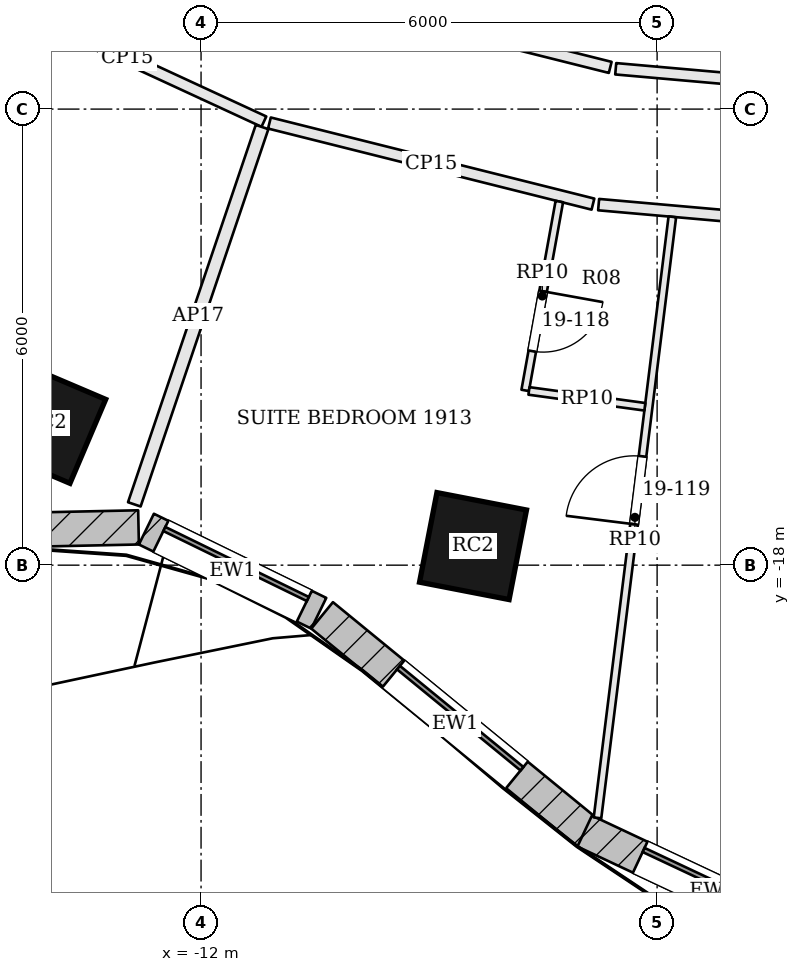
"""IFC4 building model, lengths in metres.
Left out: names, types, materials, properties, quantities, classifications, styles, units other than length and angle.
Written with IfcOpenShell. Run it as: python <this file> out.ifc"""

import sys

from ifc_helpers import new_model, si_unit, direction, frame, frame_2d, origin, origin_2d, place, context, subcontext, project, spatial, rectangle, extrude, element, fill, save


model = new_model("IFC4")
c1 = context("Model", 3, precision=1e-05, world=origin(), true_north=direction((0.0, 1.0)))
c2 = subcontext(c1, "Body", "Model", "MODEL_VIEW")
j1 = project(units=[si_unit("LENGTHUNIT", "METRE"), si_unit("PLANEANGLEUNIT", "RADIAN")], contexts=[c1])
p1 = place(None, origin())
s1 = spatial("IfcSite", under=j1, at=p1, CompositionType="ELEMENT")
p2 = place(p1, origin())
s2 = spatial("IfcBuilding", under=s1, at=p2, CompositionType="ELEMENT")
p3 = place(p2, frame((0.0, 0.0, 85.2)))
s3 = spatial("IfcBuildingStorey", under=s2, at=p3, CompositionType="ELEMENT", Elevation=85.2)
for number, where, z_axis, x_axis in (
    (1, (-14.042, -16.136, 0.0), (0.0, 0.0, 1.0), (0.92, -0.392, 0.0)),
    (2, (-8.422, -17.749, 0.0), (0.0, 0.0, 1.0), (0.982, -0.191, 0.0)),
):
    element("IfcColumn", number, at=place(p3, frame(where, z_axis=z_axis, x_axis=x_axis)), inside=s3, PredefinedType="COLUMN", context=c2, shape_type="SweptSolid", body=[
        extrude(rectangle(XDim=1.2, YDim=1.2, at=origin_2d()), origin(), (0.0, 0.0, 1.0), 3.6),
    ])
p4 = place(p3, frame((-18.434, -17.622, 0.0), z_axis=(0.0, 0.0, 1.0), x_axis=(0.999773749739, 0.021270856405, 0.0)))
e3 = element("IfcWall", 3, at=p4, inside=s3, PredefinedType="SOLIDWALL", context=c2, shape_type="SweptSolid", body=[
    extrude(rectangle(XDim=5.613, YDim=0.45, at=frame_2d((2.806, 0.0))), origin(), (0.0, 0.0, 1.0), 3.4),
])
p5 = place(p4, frame((1.756, 0.0, 0.9)))
e4 = element("IfcOpeningElement", 4, at=p5, cuts=e3, PredefinedType="OPENING", context=c2, shape_type="SweptSolid", body=[
    extrude(rectangle(XDim=2.1, YDim=2.0, at=frame_2d((1.05, 1.0))), frame((0.0, 0.235, 0.0), z_axis=(0.0, -1.0, 0.0), x_axis=(1.0, 0.0, 0.0)), (0.0, 0.0, 1.0), 0.47),
])
p6 = place(p3, frame((-12.719, -17.526, 0.0), z_axis=(0.0, 0.0, 1.0), x_axis=(0.898643806462, -0.438679050226, 0.0)))
e5 = element("IfcWall", 5, at=p6, inside=s3, PredefinedType="SOLIDWALL", context=c2, shape_type="SweptSolid", body=[
    extrude(rectangle(XDim=2.523, YDim=0.45, at=frame_2d((1.262, 0.0))), origin(), (0.0, 0.0, 1.0), 3.4),
])
p7 = place(p6, frame((0.212, 0.0, 0.9)))
e6 = element("IfcOpeningElement", 6, at=p7, cuts=e5, PredefinedType="OPENING", context=c2, shape_type="SweptSolid", body=[
    extrude(rectangle(XDim=2.1, YDim=2.0, at=frame_2d((1.05, 1.0))), frame((0.0, 0.235, 0.0), z_axis=(0.0, -1.0, 0.0), x_axis=(1.0, 0.0, 0.0)), (0.0, 0.0, 1.0), 0.47),
])
p8 = place(p3, frame((-10.407, -18.661, 0.0), z_axis=(0.0, 0.0, 1.0), x_axis=(0.773702458947, -0.633549133864, 0.0)))
e7 = element("IfcWall", 7, at=p8, inside=s3, PredefinedType="SOLIDWALL", context=c2, shape_type="SweptSolid", body=[
    extrude(rectangle(XDim=4.526, YDim=0.45, at=frame_2d((2.263, 0.0))), origin(), (0.0, 0.0, 1.0), 3.4),
])
p9 = place(p8, frame((1.213, 0.0, 0.9)))
e8 = element("IfcOpeningElement", 8, at=p9, cuts=e7, PredefinedType="OPENING", context=c2, shape_type="SweptSolid", body=[
    extrude(rectangle(XDim=2.1, YDim=2.0, at=frame_2d((1.05, 1.0))), frame((0.0, 0.235, 0.0), z_axis=(0.0, -1.0, 0.0), x_axis=(1.0, 0.0, 0.0)), (0.0, 0.0, 1.0), 0.47),
])
p10 = place(p3, frame((-6.953, -21.499, 0.0), z_axis=(0.0, 0.0, 1.0), x_axis=(0.905034581957, -0.425337989676, 0.0)))
e9 = element("IfcWall", 9, at=p10, inside=s3, PredefinedType="SOLIDWALL", context=c2, shape_type="SweptSolid", body=[
    extrude(rectangle(XDim=3.714, YDim=0.45, at=frame_2d((1.857, 0.0))), origin(), (0.0, 0.0, 1.0), 3.4),
])
p11 = place(p10, frame((0.807, 0.0, 0.9)))
e10 = element("IfcOpeningElement", 10, at=p11, cuts=e9, PredefinedType="OPENING", context=c2, shape_type="SweptSolid", body=[
    extrude(rectangle(XDim=2.1, YDim=2.0, at=frame_2d((1.05, 1.0))), frame((0.0, 0.235, 0.0), z_axis=(0.0, -1.0, 0.0), x_axis=(1.0, 0.0, 0.0)), (0.0, 0.0, 1.0), 0.47),
])
p12 = place(p3, frame((-14.771, -10.502, 0.0), z_axis=(0.0, 0.0, 1.0), x_axis=(0.907742896312, -0.419526917128, 0.0)))
e11 = element("IfcWall", 11, at=p12, inside=s3, PredefinedType="PARTITIONING", context=c2, shape_type="SweptSolid", body=[
    extrude(rectangle(XDim=3.963, YDim=0.15, at=frame_2d((1.981, 0.0))), origin(), (0.0, 0.0, 1.0), 2.784),
])
p13 = place(p3, frame((-12.878, -17.2, 0.0), z_axis=(0.0, 0.0, 1.0), x_axis=(0.320668187518, 0.947191592823, 0.0)))
e12 = element("IfcWall", 12, at=p13, inside=s3, PredefinedType="PARTITIONING", context=c2, shape_type="SweptSolid", body=[
    extrude(rectangle(XDim=5.241, YDim=0.175, at=frame_2d((2.621, 0.0))), origin(), (0.0, 0.0, 1.0), 2.784),
])
p14 = place(p3, frame((-11.101, -12.183, 0.0), z_axis=(0.0, 0.0, 1.0), x_axis=(0.969991763536, -0.24313777714, 0.0)))
e13 = element("IfcWall", 13, at=p14, inside=s3, PredefinedType="PARTITIONING", context=c2, shape_type="SweptSolid", body=[
    extrude(rectangle(XDim=4.388, YDim=0.15, at=frame_2d((2.194, 0.0))), origin(), (0.0, 0.0, 1.0), 2.784),
])
p15 = place(p3, frame((-6.77, -13.257, 0.0), z_axis=(0.0, 0.0, 1.0), x_axis=(0.996139758015, -0.08778144737, 0.0)))
e14 = element("IfcWall", 14, at=p15, inside=s3, PredefinedType="PARTITIONING", context=c2, shape_type="SweptSolid", body=[
    extrude(rectangle(XDim=4.756, YDim=0.15, at=frame_2d((2.378, 0.0))), origin(), (0.0, 0.0, 1.0), 2.784),
])
p16 = place(p15, frame((3.299, 0.0, 0.0)))
e15 = element("IfcOpeningElement", 15, at=p16, cuts=e14, PredefinedType="OPENING", context=c2, shape_type="SweptSolid", body=[
    extrude(rectangle(XDim=1.0, YDim=2.1, at=frame_2d((0.5, 1.05))), frame((0.0, 0.085, 0.0), z_axis=(0.0, -1.0, 0.0), x_axis=(1.0, 0.0, 0.0)), (0.0, 0.0, 1.0), 0.17),
])
p17 = place(p3, frame((-2.051, -11.865, 0.0), z_axis=(0.0, 0.0, 1.0), x_axis=(-0.996139599493, 0.087783246245, 0.0)))
e16 = element("IfcWall", 16, at=p17, inside=s3, PredefinedType="PARTITIONING", context=c2, shape_type="SweptSolid", body=[
    extrude(rectangle(XDim=4.511, YDim=0.15, at=frame_2d((2.255, 0.0))), origin(), (0.0, 0.0, 1.0), 2.784),
])
p18 = place(p3, frame((-6.617, -11.451, 0.0), z_axis=(0.0, 0.0, 1.0), x_axis=(-0.969987441267, 0.243155020069, 0.0)))
e17 = element("IfcWall", 17, at=p18, inside=s3, PredefinedType="PARTITIONING", context=c2, shape_type="SweptSolid", body=[
    extrude(rectangle(XDim=4.359, YDim=0.15, at=frame_2d((2.179, 0.0))), origin(), (0.0, 0.0, 1.0), 2.784),
])
p19 = place(p3, frame((-6.784, -21.325, 0.0), z_axis=(0.0, 0.0, 1.0), x_axis=(0.123563365561, 0.992336684141, 0.0)))
e18 = element("IfcWall", 18, at=p19, inside=s3, PredefinedType="PARTITIONING", context=c2, shape_type="SweptSolid", body=[
    extrude(rectangle(XDim=7.969, YDim=0.1, at=frame_2d((3.984, 0.0))), origin(), (0.0, 0.0, 1.0), 2.784),
])
p20 = place(p19, frame((3.893, 0.0, 0.0)))
e19 = element("IfcOpeningElement", 19, at=p20, cuts=e18, PredefinedType="OPENING", context=c2, shape_type="SweptSolid", body=[
    extrude(rectangle(XDim=0.9, YDim=2.4, at=frame_2d((0.45, 1.2))), frame((0.0, 0.06, 0.0), z_axis=(0.0, -1.0, 0.0), x_axis=(1.0, 0.0, 0.0)), (0.0, 0.0, 1.0), 0.12),
])
p21 = place(p3, frame((-7.286, -13.216, 0.0), z_axis=(0.0, 0.0, 1.0), x_axis=(-0.177915325958, -0.984045800148, 0.0)))
e20 = element("IfcWall", 20, at=p21, inside=s3, PredefinedType="PARTITIONING", context=c2, shape_type="SweptSolid", body=[
    extrude(rectangle(XDim=2.525, YDim=0.1, at=frame_2d((1.262, 0.0))), origin(), (0.0, 0.0, 1.0), 2.784),
])
p22 = place(p21, frame((1.2, 0.0, 0.0)))
e21 = element("IfcOpeningElement", 21, at=p22, cuts=e20, PredefinedType="OPENING", context=c2, shape_type="SweptSolid", body=[
    extrude(rectangle(XDim=0.8, YDim=2.1, at=frame_2d((0.4, 1.05))), frame((0.0, 0.06, 0.0), z_axis=(0.0, -1.0, 0.0), x_axis=(1.0, 0.0, 0.0)), (0.0, 0.0, 1.0), 0.12),
])
p23 = place(p3, frame((-7.686, -15.708, 0.0), z_axis=(0.0, 0.0, 1.0), x_axis=(0.990778929456, -0.13548842366, 0.0)))
e22 = element("IfcWall", 22, at=p23, inside=s3, PredefinedType="PARTITIONING", context=c2, shape_type="SweptSolid", body=[
    extrude(rectangle(XDim=1.539, YDim=0.1, at=frame_2d((0.77, 0.0))), origin(), (0.0, 0.0, 1.0), 2.784),
])
p24 = place(p7, origin())
e23 = element("IfcWindow", 23, at=p24, inside=s3, PartitioningType="SINGLE_PANEL", PredefinedType="WINDOW", context=c2, shape_type="SweptSolid", body=[
    extrude(rectangle(XDim=2.1, YDim=2.0, at=frame_2d((1.05, 1.0))), frame((0.0, 0.135, 0.0), z_axis=(0.0, -1.0, 0.0), x_axis=(1.0, 0.0, 0.0)), (0.0, 0.0, 1.0), 0.06),
])
fill(e6, e23)
p25 = place(p9, origin())
e24 = element("IfcWindow", 24, at=p25, inside=s3, PartitioningType="SINGLE_PANEL", PredefinedType="WINDOW", context=c2, shape_type="SweptSolid", body=[
    extrude(rectangle(XDim=2.1, YDim=2.0, at=frame_2d((1.05, 1.0))), frame((0.0, 0.135, 0.0), z_axis=(0.0, -1.0, 0.0), x_axis=(1.0, 0.0, 0.0)), (0.0, 0.0, 1.0), 0.06),
])
fill(e8, e24)
p26 = place(p11, origin())
e25 = element("IfcWindow", 25, at=p26, inside=s3, PartitioningType="SINGLE_PANEL", PredefinedType="WINDOW", context=c2, shape_type="SweptSolid", body=[
    extrude(rectangle(XDim=2.1, YDim=2.0, at=frame_2d((1.05, 1.0))), frame((0.0, 0.135, 0.0), z_axis=(0.0, -1.0, 0.0), x_axis=(1.0, 0.0, 0.0)), (0.0, 0.0, 1.0), 0.06),
])
fill(e10, e25)
p27 = place(p22, origin())
e26 = element("IfcDoor", 26, at=p27, inside=s3, OperationType="SINGLE_SWING_LEFT", PredefinedType="DOOR", context=c2, shape_type="SweptSolid", body=[
    extrude(rectangle(XDim=0.8, YDim=2.1, at=frame_2d((0.4, 1.05))), frame((0.0, 0.025, 0.0), z_axis=(0.0, -1.0, 0.0), x_axis=(1.0, 0.0, 0.0)), (0.0, 0.0, 1.0), 0.05),
])
fill(e21, e26)
p28 = place(p20, origin())
e27 = element("IfcDoor", 27, at=p28, inside=s3, OperationType="SINGLE_SWING_LEFT", PredefinedType="DOOR", context=c2, shape_type="SweptSolid", body=[
    extrude(rectangle(XDim=0.9, YDim=2.4, at=frame_2d((0.45, 1.2))), frame((0.0, 0.025, 0.0), z_axis=(0.0, -1.0, 0.0), x_axis=(1.0, 0.0, 0.0)), (0.0, 0.0, 1.0), 0.05),
])
fill(e19, e27)
save(model, sys.argv[1])
